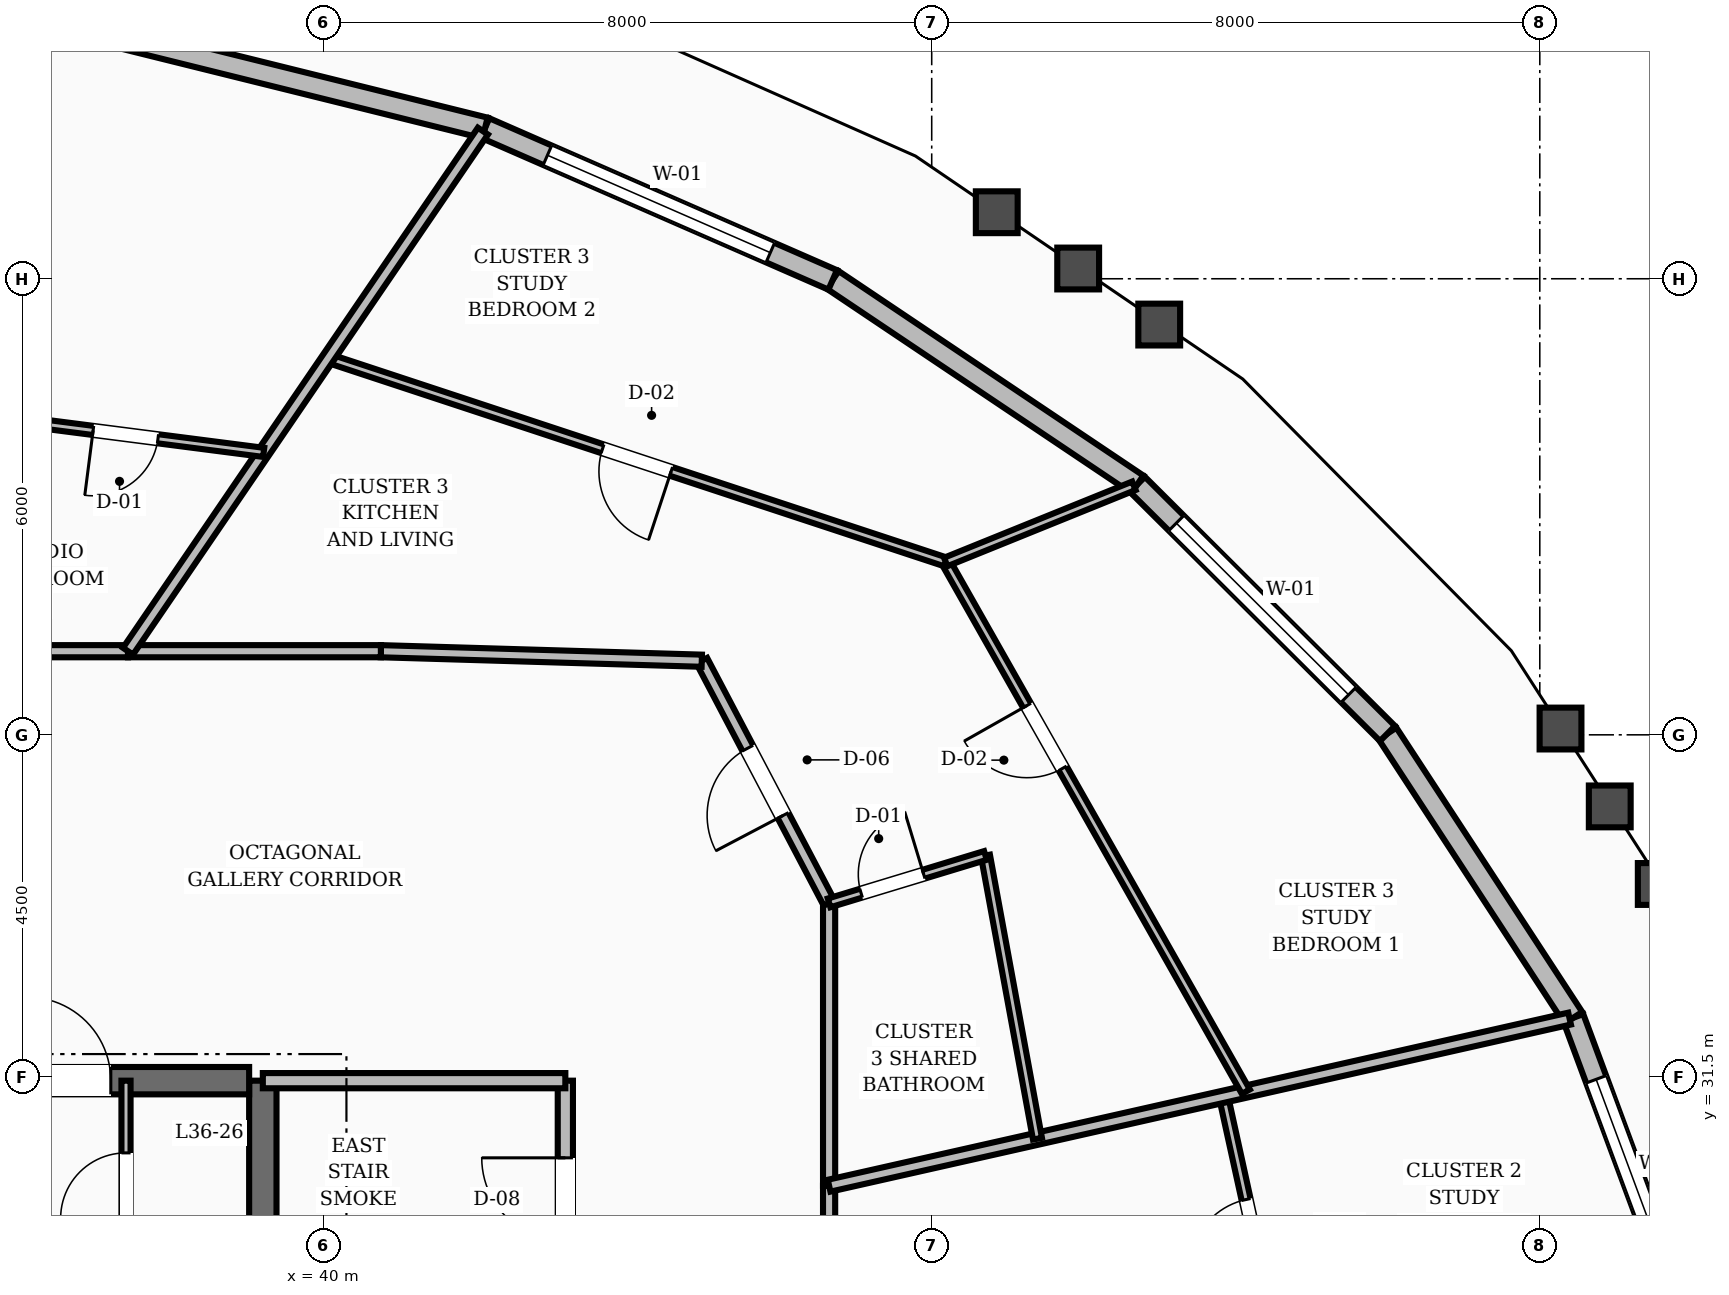
"""IFC4 building model, lengths in metres.
Left out: names, types, materials, properties, quantities, classifications, styles, units other than length and angle.
Written with IfcOpenShell. Run it as: python <this file> out.ifc"""

import sys

from ifc_helpers import new_model, si_unit, direction, frame, frame_2d, origin, place, context, subcontext, project, spatial, rectangle, extrude, element, fill, save


model = new_model("IFC4")
c1 = context("Model", 3, precision=1e-05, world=origin(), true_north=direction((0.0, 1.0)))
c2 = subcontext(c1, "Body", "Model", "MODEL_VIEW")
j1 = project(units=[si_unit("LENGTHUNIT", "METRE"), si_unit("PLANEANGLEUNIT", "RADIAN")], contexts=[c1])
p1 = place(None, origin())
s1 = spatial("IfcSite", under=j1, at=p1, CompositionType="ELEMENT")
p2 = place(p1, origin())
s2 = spatial("IfcBuilding", under=s1, at=p2, CompositionType="ELEMENT")
p3 = place(p2, frame((0.0, 0.0, 142.4)))
s3 = spatial("IfcBuildingStorey", under=s2, at=p3, CompositionType="ELEMENT", Elevation=142.4)
p4 = place(p3, frame((39.2, 25.15, 0.0), z_axis=(0.0, 0.0, 1.0), x_axis=(0.0, 1.0, 0.0)))
e1 = element("IfcWall", 1, at=p4, inside=s3, PredefinedType="SHEAR", context=c2, shape_type="SweptSolid", body=[
    extrude(rectangle(XDim=6.3, YDim=0.36, at=frame_2d((3.15, 0.0))), origin(), (0.0, 0.0, 1.0), 3.6),
])
p5 = place(p3, frame((35.8, 31.45, 0.0), z_axis=(0.0, 0.0, 1.0), x_axis=(1.0, 0.0, 0.0)))
e2 = element("IfcWall", 2, at=p5, inside=s3, PredefinedType="SHEAR", context=c2, shape_type="SweptSolid", body=[
    extrude(rectangle(XDim=3.22, YDim=0.36, at=frame_2d((1.61, 0.0))), origin(), (0.0, 0.0, 1.0), 3.6),
])
p6 = place(p5, frame((0.3, 0.0, 0.0)))
e3 = element("IfcOpeningElement", 3, at=p6, cuts=e2, PredefinedType="OPENING", context=c2, shape_type="SweptSolid", body=[
    extrude(rectangle(XDim=1.1, YDim=2.1, at=frame_2d((0.55, 1.05))), frame((0.0, 0.19, 0.0), z_axis=(0.0, -1.0, 0.0), x_axis=(1.0, 0.0, 0.0)), (0.0, 0.0, 1.0), 0.38),
])
p7 = place(p3, frame((57.946, 28.22, 0.0), z_axis=(0.0, 0.0, 1.0), x_axis=(-0.347832416273, 0.937556723719, 0.0)))
e4 = element("IfcWall", 4, at=p7, inside=s3, PredefinedType="STANDARD", context=c2, shape_type="SweptSolid", body=[
    extrude(rectangle(XDim=4.328, YDim=0.28, at=frame_2d((2.164, 0.0))), origin(), (0.0, 0.0, 1.0), 2.82),
])
p8 = place(p7, frame((0.864, 0.0, 0.8)))
e5 = element("IfcOpeningElement", 5, at=p8, cuts=e4, PredefinedType="OPENING", context=c2, shape_type="SweptSolid", body=[
    extrude(rectangle(XDim=2.6, YDim=1.65, at=frame_2d((1.3, 0.825))), frame((0.0, 0.15, 0.0), z_axis=(0.0, -1.0, 0.0), x_axis=(1.0, 0.0, 0.0)), (0.0, 0.0, 1.0), 0.3),
])
p9 = place(p3, frame((56.441, 32.278, 0.0), z_axis=(0.0, 0.0, 1.0), x_axis=(-0.547212555107, 0.836993679506, 0.0)))
e6 = element("IfcWall", 6, at=p9, inside=s3, PredefinedType="STANDARD", context=c2, shape_type="SweptSolid", body=[
    extrude(rectangle(XDim=4.468, YDim=0.28, at=frame_2d((2.234, 0.0))), origin(), (0.0, 0.0, 1.0), 2.82),
])
p10 = place(p3, frame((53.996, 36.017, 0.0), z_axis=(0.0, 0.0, 1.0), x_axis=(-0.708393596514, 0.705817619799, 0.0)))
e7 = element("IfcWall", 7, at=p10, inside=s3, PredefinedType="STANDARD", context=c2, shape_type="SweptSolid", body=[
    extrude(rectangle(XDim=4.644, YDim=0.28, at=frame_2d((2.322, 0.0))), origin(), (0.0, 0.0, 1.0), 2.82),
])
p11 = place(p10, frame((0.722, 0.0, 0.8)))
e8 = element("IfcOpeningElement", 8, at=p11, cuts=e7, PredefinedType="OPENING", context=c2, shape_type="SweptSolid", body=[
    extrude(rectangle(XDim=3.2, YDim=1.65, at=frame_2d((1.6, 0.825))), frame((0.0, 0.15, 0.0), z_axis=(0.0, -1.0, 0.0), x_axis=(1.0, 0.0, 0.0)), (0.0, 0.0, 1.0), 0.3),
])
p12 = place(p3, frame((50.706, 39.295, 0.0), z_axis=(0.0, 0.0, 1.0), x_axis=(-0.830381581739, 0.55719514419, 0.0)))
e9 = element("IfcWall", 9, at=p12, inside=s3, PredefinedType="STANDARD", context=c2, shape_type="SweptSolid", body=[
    extrude(rectangle(XDim=4.828, YDim=0.28, at=frame_2d((2.414, 0.0))), origin(), (0.0, 0.0, 1.0), 2.82),
])
p13 = place(p3, frame((46.698, 41.985, 0.0), z_axis=(0.0, 0.0, 1.0), x_axis=(-0.916303206083, 0.400485248821, 0.0)))
e10 = element("IfcWall", 10, at=p13, inside=s3, PredefinedType="STANDARD", context=c2, shape_type="SweptSolid", body=[
    extrude(rectangle(XDim=4.991, YDim=0.28, at=frame_2d((2.496, 0.0))), origin(), (0.0, 0.0, 1.0), 2.82),
])
p14 = place(p13, frame((0.896, 0.0, 0.8)))
e11 = element("IfcOpeningElement", 11, at=p14, cuts=e10, PredefinedType="OPENING", context=c2, shape_type="SweptSolid", body=[
    extrude(rectangle(XDim=3.2, YDim=1.65, at=frame_2d((1.6, 0.825))), frame((0.0, 0.15, 0.0), z_axis=(0.0, -1.0, 0.0), x_axis=(1.0, 0.0, 0.0)), (0.0, 0.0, 1.0), 0.3),
])
p15 = place(p3, frame((42.124, 43.984, 0.0), z_axis=(0.0, 0.0, 1.0), x_axis=(-0.970601368837, 0.240692714498, 0.0)))
e12 = element("IfcWall", 12, at=p15, inside=s3, PredefinedType="STANDARD", context=c2, shape_type="SweptSolid", body=[
    extrude(rectangle(XDim=5.113, YDim=0.28, at=frame_2d((2.557, 0.0))), origin(), (0.0, 0.0, 1.0), 2.82),
])
p16 = place(p3, frame((43.18, 28.32, 0.0), z_axis=(0.0, 0.0, 1.0), x_axis=(0.0, 1.0, 0.0)))
e13 = element("IfcWall", 13, at=p16, inside=s3, PredefinedType="SOLIDWALL", context=c2, shape_type="SweptSolid", body=[
    extrude(rectangle(XDim=3.13, YDim=0.2, at=frame_2d((1.565, 0.0))), origin(), (0.0, 0.0, 1.0), 2.8),
])
p17 = place(p16, frame((1.015, 0.0, 0.0)))
e14 = element("IfcOpeningElement", 14, at=p17, cuts=e13, PredefinedType="OPENING", context=c2, shape_type="SweptSolid", body=[
    extrude(rectangle(XDim=1.1, YDim=2.1, at=frame_2d((0.55, 1.05))), frame((0.0, 0.11, 0.0), z_axis=(0.0, -1.0, 0.0), x_axis=(1.0, 0.0, 0.0)), (0.0, 0.0, 1.0), 0.22),
])
p18 = place(p3, frame((39.2, 31.45, 0.0), z_axis=(0.0, 0.0, 1.0), x_axis=(1.0, 0.0, 0.0)))
e15 = element("IfcWall", 15, at=p18, inside=s3, PredefinedType="SOLIDWALL", context=c2, shape_type="SweptSolid", body=[
    extrude(rectangle(XDim=3.98, YDim=0.2, at=frame_2d((1.99, 0.0))), origin(), (0.0, 0.0, 1.0), 2.8),
])
p19 = place(p3, frame((37.4, 25.25, 0.0), z_axis=(0.0, 0.0, 1.0), x_axis=(0.0, 1.0, 0.0)))
e16 = element("IfcWall", 16, at=p19, inside=s3, PredefinedType="PARTITIONING", context=c2, shape_type="SweptSolid", body=[
    extrude(rectangle(XDim=6.2, YDim=0.12, at=frame_2d((3.1, 0.0))), origin(), (0.0, 0.0, 1.0), 2.8),
])
p20 = place(p19, frame((0.44, 0.0, 0.0)))
e17 = element("IfcOpeningElement", 17, at=p20, cuts=e16, PredefinedType="OPENING", context=c2, shape_type="SweptSolid", body=[
    extrude(rectangle(XDim=0.86, YDim=2.1, at=frame_2d((0.43, 1.05))), frame((0.0, 0.07, 0.0), z_axis=(0.0, -1.0, 0.0), x_axis=(1.0, 0.0, 0.0)), (0.0, 0.0, 1.0), 0.14),
])
p21 = place(p19, frame((2.37, 0.0, 0.0)))
e18 = element("IfcOpeningElement", 18, at=p21, cuts=e16, PredefinedType="OPENING", context=c2, shape_type="SweptSolid", body=[
    extrude(rectangle(XDim=0.86, YDim=2.1, at=frame_2d((0.43, 1.05))), frame((0.0, 0.07, 0.0), z_axis=(0.0, -1.0, 0.0), x_axis=(1.0, 0.0, 0.0)), (0.0, 0.0, 1.0), 0.14),
])
p22 = place(p19, frame((4.39, 0.0, 0.0)))
e19 = element("IfcOpeningElement", 19, at=p22, cuts=e16, PredefinedType="OPENING", context=c2, shape_type="SweptSolid", body=[
    extrude(rectangle(XDim=0.86, YDim=2.1, at=frame_2d((0.43, 1.05))), frame((0.0, 0.07, 0.0), z_axis=(0.0, -1.0, 0.0), x_axis=(1.0, 0.0, 0.0)), (0.0, 0.0, 1.0), 0.14),
])
p23 = place(p3, frame((46.65, 26.914, 0.0), z_axis=(0.0, 0.0, 1.0), x_axis=(0.0, 1.0, 0.0)))
e20 = element("IfcWall", 20, at=p23, inside=s3, PredefinedType="SOLIDWALL", context=c2, shape_type="SweptSolid", body=[
    extrude(rectangle(XDim=3.154, YDim=0.16, at=frame_2d((1.577, 0.0))), origin(), (0.0, 0.0, 1.0), 2.8),
])
p24 = place(p3, frame((46.65, 30.068, 0.0), z_axis=(0.0, 0.0, 1.0), x_axis=(0.0, 1.0, 0.0)))
e21 = element("IfcWall", 21, at=p24, inside=s3, PredefinedType="SOLIDWALL", context=c2, shape_type="SweptSolid", body=[
    extrude(rectangle(XDim=3.721, YDim=0.16, at=frame_2d((1.86, 0.0))), origin(), (0.0, 0.0, 1.0), 2.8),
])
p25 = place(p3, frame((46.65, 33.789, 0.0), z_axis=(0.0, 0.0, 1.0), x_axis=(-0.46527115782, 0.885168204185, 0.0)))
e22 = element("IfcWall", 22, at=p25, inside=s3, PredefinedType="SOLIDWALL", context=c2, shape_type="SweptSolid", body=[
    extrude(rectangle(XDim=3.6, YDim=0.16, at=frame_2d((1.8, 0.0))), origin(), (0.0, 0.0, 1.0), 2.8),
])
p26 = place(p25, frame((1.3, 0.0, 0.0)))
e23 = element("IfcOpeningElement", 23, at=p26, cuts=e22, PredefinedType="OPENING", context=c2, shape_type="SweptSolid", body=[
    extrude(rectangle(XDim=1.0, YDim=2.1, at=frame_2d((0.5, 1.05))), frame((0.0, 0.09, 0.0), z_axis=(0.0, -1.0, 0.0), x_axis=(1.0, 0.0, 0.0)), (0.0, 0.0, 1.0), 0.18),
])
p27 = place(p3, frame((44.975, 36.975, 0.0), z_axis=(0.0, 0.0, 1.0), x_axis=(-0.999561990195, 0.029594387265, 0.0)))
e24 = element("IfcWall", 24, at=p27, inside=s3, PredefinedType="SOLIDWALL", context=c2, shape_type="SweptSolid", body=[
    extrude(rectangle(XDim=4.224, YDim=0.16, at=frame_2d((2.112, 0.0))), origin(), (0.0, 0.0, 1.0), 2.8),
])
p28 = place(p3, frame((40.753, 37.1, 0.0), z_axis=(0.0, 0.0, 1.0), x_axis=(-1.0, 0.0, 0.0)))
e25 = element("IfcWall", 25, at=p28, inside=s3, PredefinedType="SOLIDWALL", context=c2, shape_type="SweptSolid", body=[
    extrude(rectangle(XDim=3.327, YDim=0.16, at=frame_2d((1.664, 0.0))), origin(), (0.0, 0.0, 1.0), 2.8),
])
p29 = place(p3, frame((37.426, 37.1, 0.0), z_axis=(0.0, 0.0, 1.0), x_axis=(-1.0, 0.0, 0.0)))
e26 = element("IfcWall", 26, at=p29, inside=s3, PredefinedType="SOLIDWALL", context=c2, shape_type="SweptSolid", body=[
    extrude(rectangle(XDim=2.821, YDim=0.16, at=frame_2d((1.41, 0.0))), origin(), (0.0, 0.0, 1.0), 2.8),
])
p30 = place(p3, frame((52.637, 27.606, 0.0), z_axis=(0.0, 0.0, 1.0), x_axis=(-0.214497403301, 0.97672455891, 0.0)))
e27 = element("IfcWall", 27, at=p30, inside=s3, PredefinedType="PARTITIONING", context=c2, shape_type="SweptSolid", body=[
    extrude(rectangle(XDim=3.72, YDim=0.12, at=frame_2d((1.86, 0.0))), origin(), (0.0, 0.0, 1.0), 2.8),
])
p31 = place(p30, frame((1.385, 0.0, 0.0)))
e28 = element("IfcOpeningElement", 28, at=p31, cuts=e27, PredefinedType="OPENING", context=c2, shape_type="SweptSolid", body=[
    extrude(rectangle(XDim=0.95, YDim=2.1, at=frame_2d((0.475, 1.05))), frame((0.0, 0.07, 0.0), z_axis=(0.0, -1.0, 0.0), x_axis=(1.0, 0.0, 0.0)), (0.0, 0.0, 1.0), 0.14),
])
p32 = place(p3, frame((46.65, 30.068, 0.0), z_axis=(0.0, 0.0, 1.0), x_axis=(0.97547030374, 0.220131066689, 0.0)))
e29 = element("IfcWall", 29, at=p32, inside=s3, PredefinedType="SOLIDWALL", context=c2, shape_type="SweptSolid", body=[
    extrude(rectangle(XDim=9.987, YDim=0.16, at=frame_2d((4.994, 0.0))), origin(), (0.0, 0.0, 1.0), 2.8),
])
p33 = place(p3, frame((49.392, 30.687, 0.0), z_axis=(0.0, 0.0, 1.0), x_axis=(-0.180762204069, 0.983526830127, 0.0)))
e30 = element("IfcWall", 30, at=p33, inside=s3, PredefinedType="PARTITIONING", context=c2, shape_type="SweptSolid", body=[
    extrude(rectangle(XDim=3.789, YDim=0.12, at=frame_2d((1.894, 0.0))), origin(), (0.0, 0.0, 1.0), 2.8),
])
p34 = place(p3, frame((46.65, 33.789, 0.0), z_axis=(0.0, 0.0, 1.0), x_axis=(0.956930737549, 0.290316316341, 0.0)))
e31 = element("IfcWall", 31, at=p34, inside=s3, PredefinedType="PARTITIONING", context=c2, shape_type="SweptSolid", body=[
    extrude(rectangle(XDim=2.149, YDim=0.12, at=frame_2d((1.075, 0.0))), origin(), (0.0, 0.0, 1.0), 2.8),
])
p35 = place(p34, frame((0.44, 0.0, 0.0)))
e32 = element("IfcOpeningElement", 32, at=p35, cuts=e31, PredefinedType="OPENING", context=c2, shape_type="SweptSolid", body=[
    extrude(rectangle(XDim=0.86, YDim=2.1, at=frame_2d((0.43, 1.05))), frame((0.0, 0.07, 0.0), z_axis=(0.0, -1.0, 0.0), x_axis=(1.0, 0.0, 0.0)), (0.0, 0.0, 1.0), 0.14),
])
p36 = place(p3, frame((52.133, 31.305, 0.0), z_axis=(0.0, 0.0, 1.0), x_axis=(-0.492944891057, 0.870060534895, 0.0)))
e33 = element("IfcWall", 33, at=p36, inside=s3, PredefinedType="PARTITIONING", context=c2, shape_type="SweptSolid", body=[
    extrude(rectangle(XDim=8.01, YDim=0.12, at=frame_2d((4.005, 0.0))), origin(), (0.0, 0.0, 1.0), 2.8),
])
p37 = place(p36, frame((4.889, 0.0, 0.0)))
e34 = element("IfcOpeningElement", 34, at=p37, cuts=e33, PredefinedType="OPENING", context=c2, shape_type="SweptSolid", body=[
    extrude(rectangle(XDim=0.95, YDim=2.1, at=frame_2d((0.475, 1.05))), frame((0.0, 0.07, 0.0), z_axis=(0.0, -1.0, 0.0), x_axis=(1.0, 0.0, 0.0)), (0.0, 0.0, 1.0), 0.14),
])
p38 = place(p3, frame((48.185, 38.274, 0.0), z_axis=(0.0, 0.0, 1.0), x_axis=(-0.949679826918, 0.313222327342, 0.0)))
e35 = element("IfcWall", 35, at=p38, inside=s3, PredefinedType="PARTITIONING", context=c2, shape_type="SweptSolid", body=[
    extrude(rectangle(XDim=8.558, YDim=0.12, at=frame_2d((4.279, 0.0))), origin(), (0.0, 0.0, 1.0), 2.8),
])
p39 = place(p38, frame((3.804, 0.0, 0.0)))
e36 = element("IfcOpeningElement", 36, at=p39, cuts=e35, PredefinedType="OPENING", context=c2, shape_type="SweptSolid", body=[
    extrude(rectangle(XDim=0.95, YDim=2.1, at=frame_2d((0.475, 1.05))), frame((0.0, 0.07, 0.0), z_axis=(0.0, -1.0, 0.0), x_axis=(1.0, 0.0, 0.0)), (0.0, 0.0, 1.0), 0.14),
])
p40 = place(p3, frame((48.185, 38.274, 0.0), z_axis=(0.0, 0.0, 1.0), x_axis=(0.926943027984, 0.375202109365, 0.0)))
e37 = element("IfcWall", 37, at=p40, inside=s3, PredefinedType="PARTITIONING", context=c2, shape_type="SweptSolid", body=[
    extrude(rectangle(XDim=2.67, YDim=0.12, at=frame_2d((1.335, 0.0))), origin(), (0.0, 0.0, 1.0), 2.8),
])
p41 = place(p3, frame((37.426, 37.1, 0.0), z_axis=(0.0, 0.0, 1.0), x_axis=(0.563666009878, 0.82600280224, 0.0)))
e38 = element("IfcWall", 38, at=p41, inside=s3, PredefinedType="SOLIDWALL", context=c2, shape_type="SweptSolid", body=[
    extrude(rectangle(XDim=8.284, YDim=0.16, at=frame_2d((4.142, 0.0))), origin(), (0.0, 0.0, 1.0), 2.8),
])
p42 = place(p3, frame((39.211, 39.716, 0.0), z_axis=(0.0, 0.0, 1.0), x_axis=(-0.991818189367, 0.12765844759, 0.0)))
e39 = element("IfcWall", 39, at=p42, inside=s3, PredefinedType="PARTITIONING", context=c2, shape_type="SweptSolid", body=[
    extrude(rectangle(XDim=3.664, YDim=0.12, at=frame_2d((1.832, 0.0))), origin(), (0.0, 0.0, 1.0), 2.8),
])
p43 = place(p42, frame((1.402, 0.0, 0.0)))
e40 = element("IfcOpeningElement", 40, at=p43, cuts=e39, PredefinedType="OPENING", context=c2, shape_type="SweptSolid", body=[
    extrude(rectangle(XDim=0.86, YDim=2.1, at=frame_2d((0.43, 1.05))), frame((0.0, 0.07, 0.0), z_axis=(0.0, -1.0, 0.0), x_axis=(1.0, 0.0, 0.0)), (0.0, 0.0, 1.0), 0.14),
])
p44 = place(p8, origin())
e41 = element("IfcWindow", 41, at=p44, inside=s3, PartitioningType="SINGLE_PANEL", PredefinedType="WINDOW", context=c2, shape_type="SweptSolid", body=[
    extrude(rectangle(XDim=2.6, YDim=1.65, at=frame_2d((1.3, 0.825))), frame((0.0, 0.03, 0.0), z_axis=(0.0, -1.0, 0.0), x_axis=(1.0, 0.0, 0.0)), (0.0, 0.0, 1.0), 0.06),
])
fill(e5, e41)
p45 = place(p11, origin())
e42 = element("IfcWindow", 42, at=p45, inside=s3, PartitioningType="SINGLE_PANEL", PredefinedType="WINDOW", context=c2, shape_type="SweptSolid", body=[
    extrude(rectangle(XDim=3.2, YDim=1.65, at=frame_2d((1.6, 0.825))), frame((0.0, 0.03, 0.0), z_axis=(0.0, -1.0, 0.0), x_axis=(1.0, 0.0, 0.0)), (0.0, 0.0, 1.0), 0.06),
])
fill(e8, e42)
p46 = place(p14, origin())
e43 = element("IfcWindow", 43, at=p46, inside=s3, PartitioningType="SINGLE_PANEL", PredefinedType="WINDOW", context=c2, shape_type="SweptSolid", body=[
    extrude(rectangle(XDim=3.2, YDim=1.65, at=frame_2d((1.6, 0.825))), frame((0.0, 0.03, 0.0), z_axis=(0.0, -1.0, 0.0), x_axis=(1.0, 0.0, 0.0)), (0.0, 0.0, 1.0), 0.06),
])
fill(e11, e43)
p47 = place(p17, origin())
e44 = element("IfcDoor", 44, at=p47, inside=s3, OperationType="SINGLE_SWING_RIGHT", PredefinedType="DOOR", context=c2, shape_type="SweptSolid", body=[
    extrude(rectangle(XDim=1.1, YDim=2.1, at=frame_2d((0.55, 1.05))), frame((0.0, 0.025, 0.0), z_axis=(0.0, -1.0, 0.0), x_axis=(1.0, 0.0, 0.0)), (0.0, 0.0, 1.0), 0.05),
])
fill(e14, e44)
p48 = place(p6, origin())
e45 = element("IfcDoor", 45, at=p48, inside=s3, OperationType="SINGLE_SWING_LEFT", PredefinedType="DOOR", context=c2, shape_type="SweptSolid", body=[
    extrude(rectangle(XDim=1.1, YDim=2.1, at=frame_2d((0.55, 1.05))), frame((0.0, 0.025, 0.0), z_axis=(0.0, -1.0, 0.0), x_axis=(1.0, 0.0, 0.0)), (0.0, 0.0, 1.0), 0.05),
])
fill(e3, e45)
p49 = place(p22, origin())
e46 = element("IfcDoor", 46, at=p49, inside=s3, OperationType="SINGLE_SWING_LEFT", PredefinedType="DOOR", context=c2, shape_type="SweptSolid", body=[
    extrude(rectangle(XDim=0.86, YDim=2.1, at=frame_2d((0.43, 1.05))), frame((0.0, 0.025, 0.0), z_axis=(0.0, -1.0, 0.0), x_axis=(1.0, 0.0, 0.0)), (0.0, 0.0, 1.0), 0.05),
])
fill(e19, e46)
p50 = place(p31, origin())
e47 = element("IfcDoor", 47, at=p50, inside=s3, OperationType="SINGLE_SWING_LEFT", PredefinedType="DOOR", context=c2, shape_type="SweptSolid", body=[
    extrude(rectangle(XDim=0.95, YDim=2.1, at=frame_2d((0.475, 1.05))), frame((0.0, 0.025, 0.0), z_axis=(0.0, -1.0, 0.0), x_axis=(1.0, 0.0, 0.0)), (0.0, 0.0, 1.0), 0.05),
])
fill(e28, e47)
p51 = place(p35, origin())
e48 = element("IfcDoor", 48, at=p51, inside=s3, OperationType="SINGLE_SWING_RIGHT", PredefinedType="DOOR", context=c2, shape_type="SweptSolid", body=[
    extrude(rectangle(XDim=0.86, YDim=2.1, at=frame_2d((0.43, 1.05))), frame((0.0, 0.025, 0.0), z_axis=(0.0, -1.0, 0.0), x_axis=(1.0, 0.0, 0.0)), (0.0, 0.0, 1.0), 0.05),
])
fill(e32, e48)
p52 = place(p26, origin())
e49 = element("IfcDoor", 49, at=p52, inside=s3, OperationType="SINGLE_SWING_LEFT", PredefinedType="DOOR", context=c2, shape_type="SweptSolid", body=[
    extrude(rectangle(XDim=1.0, YDim=2.1, at=frame_2d((0.5, 1.05))), frame((0.0, 0.025, 0.0), z_axis=(0.0, -1.0, 0.0), x_axis=(1.0, 0.0, 0.0)), (0.0, 0.0, 1.0), 0.05),
])
fill(e23, e49)
p53 = place(p37, origin())
e50 = element("IfcDoor", 50, at=p53, inside=s3, OperationType="SINGLE_SWING_RIGHT", PredefinedType="DOOR", context=c2, shape_type="SweptSolid", body=[
    extrude(rectangle(XDim=0.95, YDim=2.1, at=frame_2d((0.475, 1.05))), frame((0.0, 0.025, 0.0), z_axis=(0.0, -1.0, 0.0), x_axis=(1.0, 0.0, 0.0)), (0.0, 0.0, 1.0), 0.05),
])
fill(e34, e50)
p54 = place(p39, origin())
e51 = element("IfcDoor", 51, at=p54, inside=s3, OperationType="SINGLE_SWING_LEFT", PredefinedType="DOOR", context=c2, shape_type="SweptSolid", body=[
    extrude(rectangle(XDim=0.95, YDim=2.1, at=frame_2d((0.475, 1.05))), frame((0.0, 0.025, 0.0), z_axis=(0.0, -1.0, 0.0), x_axis=(1.0, 0.0, 0.0)), (0.0, 0.0, 1.0), 0.05),
])
fill(e36, e51)
p55 = place(p43, origin())
e52 = element("IfcDoor", 52, at=p55, inside=s3, OperationType="SINGLE_SWING_RIGHT", PredefinedType="DOOR", context=c2, shape_type="SweptSolid", body=[
    extrude(rectangle(XDim=0.86, YDim=2.1, at=frame_2d((0.43, 1.05))), frame((0.0, 0.025, 0.0), z_axis=(0.0, -1.0, 0.0), x_axis=(1.0, 0.0, 0.0)), (0.0, 0.0, 1.0), 0.05),
])
fill(e40, e52)
save(model, sys.argv[1])
